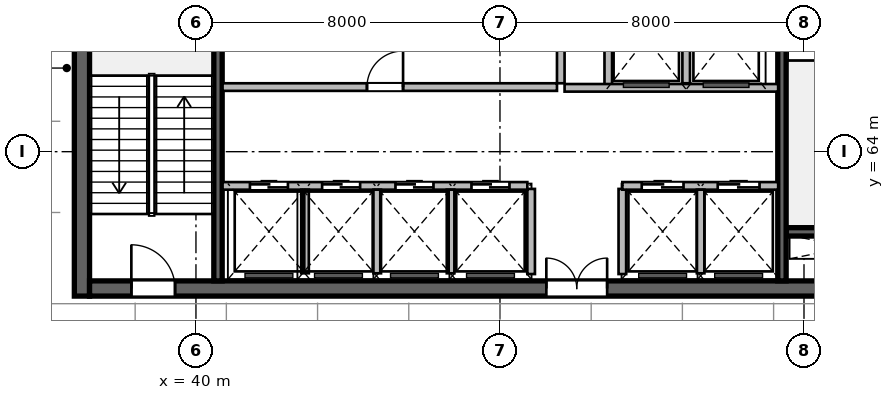
"""IFC4 building model, lengths in metres.
Left out: names, types, materials, properties, quantities, classifications, styles, units other than length and angle.
Written with IfcOpenShell. Run it as: python <this file> out.ifc"""

import sys

from ifc_helpers import new_model, si_unit, direction, frame, frame_2d, origin, place, context, subcontext, project, spatial, rectangle, extrude, source, transform, mapped, element, fill, save


model = new_model("IFC4")
c1 = context("Model", 3, precision=1e-05, world=origin(), true_north=direction((0.0, 1.0)))
c2 = subcontext(c1, "Body", "Model", "MODEL_VIEW")
j1 = project(units=[si_unit("LENGTHUNIT", "METRE"), si_unit("PLANEANGLEUNIT", "RADIAN")], contexts=[c1])
p1 = place(None, origin())
s1 = spatial("IfcSite", under=j1, at=p1, CompositionType="ELEMENT")
p2 = place(p1, origin())
s2 = spatial("IfcBuilding", under=s1, at=p2, CompositionType="ELEMENT")
p3 = place(p2, frame((0.0, 0.0, 307.8)))
s3 = spatial("IfcBuildingStorey", under=s2, at=p3, CompositionType="ELEMENT", Elevation=307.8)
m1 = source(origin(), c2, "Body", "SweptSolid", [
    extrude(rectangle(XDim=12.0, YDim=0.4, at=frame_2d((6.0, 0.0))), origin(), (0.0, 0.0, 1.0), 4.8),
])
p4 = place(p3, frame((37.0, 60.2, 0.0), z_axis=(0.0, 0.0, 1.0), x_axis=(0.0, 1.0, 0.0)))
e1 = element("IfcWall", 1, at=p4, inside=s3, PredefinedType="SHEAR", context=c2, shape_type="MappedRepresentation", body=[
    mapped(m1, transform((0.0, 0.0, 0.0), scale=1.0)),
])
m2 = source(origin(), c2, "Body", "SweptSolid", [
    extrude(rectangle(XDim=21.6, YDim=0.4, at=frame_2d((10.8, 0.0))), origin(), (0.0, 0.0, 1.0), 4.8),
])
p5 = place(p3, frame((37.2, 60.4, 0.0), z_axis=(0.0, 0.0, 1.0), x_axis=(1.0, 0.0, 0.0)))
e2 = element("IfcWall", 2, at=p5, inside=s3, PredefinedType="SHEAR", context=c2, shape_type="MappedRepresentation", body=[
    mapped(m2, transform((0.0, 0.0, 0.0), scale=1.0)),
])
p6 = place(p5, frame((1.1, 0.0, 0.0)))
e3 = element("IfcOpeningElement", 3, at=p6, cuts=e2, PredefinedType="OPENING", context=c2, shape_type="SweptSolid", body=[
    extrude(rectangle(XDim=1.15, YDim=2.15, at=frame_2d((0.575, 1.075))), frame((0.0, 0.21, 0.0), z_axis=(0.0, -1.0, 0.0), x_axis=(1.0, 0.0, 0.0)), (0.0, 0.0, 1.0), 0.42),
])
p7 = place(p5, frame((19.5, 0.0, 0.0)))
e4 = element("IfcOpeningElement", 4, at=p7, cuts=e2, PredefinedType="OPENING", context=c2, shape_type="SweptSolid", body=[
    extrude(rectangle(XDim=0.9, YDim=2.1, at=frame_2d((0.45, 1.05))), frame((0.0, 0.21, 0.0), z_axis=(0.0, -1.0, 0.0), x_axis=(1.0, 0.0, 0.0)), (0.0, 0.0, 1.0), 0.42),
])
p8 = place(p5, frame((12.02, 0.0, 0.0)))
e5 = element("IfcOpeningElement", 5, at=p8, cuts=e2, PredefinedType="OPENING", context=c2, shape_type="SweptSolid", body=[
    extrude(rectangle(XDim=1.6, YDim=2.15, at=frame_2d((0.8, 1.075))), frame((0.0, 0.21, 0.0), z_axis=(0.0, -1.0, 0.0), x_axis=(1.0, 0.0, 0.0)), (0.0, 0.0, 1.0), 0.42),
])
m3 = source(origin(), c2, "Body", "SweptSolid", [
    extrude(rectangle(XDim=3.27, YDim=0.22, at=frame_2d((1.635, 0.0))), origin(), (0.0, 0.0, 1.0), 4.8),
])
p9 = place(p3, frame((55.53, 61.89, 0.0), z_axis=(0.0, 0.0, 1.0), x_axis=(1.0, 0.0, 0.0)))
e6 = element("IfcWall", 6, at=p9, inside=s3, PredefinedType="SHEAR", context=c2, shape_type="MappedRepresentation", body=[
    mapped(m3, transform((0.0, 0.0, 0.0), scale=1.0)),
])
m4 = source(origin(), c2, "Body", "SweptSolid", [
    extrude(rectangle(XDim=11.2, YDim=0.22, at=frame_2d((5.6, 0.0))), origin(), (0.0, 0.0, 1.0), 4.8),
])
p10 = place(p3, frame((40.58, 60.6, 0.0), z_axis=(0.0, 0.0, 1.0), x_axis=(0.0, 1.0, 0.0)))
e7 = element("IfcWall", 7, at=p10, inside=s3, PredefinedType="SHEAR", context=c2, shape_type="MappedRepresentation", body=[
    mapped(m4, transform((0.0, 0.0, 0.0), scale=1.0)),
])
p11 = place(p3, frame((55.42, 60.6, 0.0), z_axis=(0.0, 0.0, 1.0), x_axis=(0.0, 1.0, 0.0)))
e8 = element("IfcWall", 8, at=p11, inside=s3, PredefinedType="SHEAR", context=c2, shape_type="MappedRepresentation", body=[
    mapped(m4, transform((0.0, 0.0, 0.0), scale=1.0)),
])
p12 = place(p11, frame((9.645, 0.0, 0.0)))
e9 = element("IfcOpeningElement", 9, at=p12, cuts=e8, PredefinedType="OPENING", context=c2, shape_type="SweptSolid", body=[
    extrude(rectangle(XDim=1.15, YDim=2.15, at=frame_2d((0.575, 1.075))), frame((0.0, 0.12, 0.0), z_axis=(0.0, -1.0, 0.0), x_axis=(1.0, 0.0, 0.0)), (0.0, 0.0, 1.0), 0.24),
])
m5 = source(origin(), c2, "Body", "SweptSolid", [
    extrude(rectangle(XDim=2.24, YDim=0.2, at=frame_2d((1.12, 0.0))), origin(), (0.0, 0.0, 1.0), 4.5),
])
for number, where, z_axis, x_axis in (
    (10, (48.82, 60.78, 0.0), (0.0, 0.0, 1.0), (0.0, 1.0, 0.0)),
    (11, (51.22, 60.78, 0.0), (0.0, 0.0, 1.0), (0.0, 1.0, 0.0)),
):
    element("IfcWall", number, at=place(p3, frame(where, z_axis=z_axis, x_axis=x_axis)), inside=s3, PredefinedType="SOLIDWALL", context=c2, shape_type="MappedRepresentation", body=[
        mapped(m5, transform((0.0, 0.0, 0.0), scale=1.0)),
    ])
m6 = source(origin(), c2, "Body", "SweptSolid", [
    extrude(rectangle(XDim=5.8, YDim=0.2, at=frame_2d((2.9, 0.0))), origin(), (0.0, 0.0, 1.0), 4.5),
])
p13 = place(p3, frame((49.6, 65.8, 0.0), z_axis=(0.0, 0.0, 1.0), x_axis=(0.0, 1.0, 0.0)))
e12 = element("IfcWall", 12, at=p13, inside=s3, PredefinedType="SOLIDWALL", context=c2, shape_type="MappedRepresentation", body=[
    mapped(m6, transform((0.0, 0.0, 0.0), scale=1.0)),
])
m7 = source(origin(), c2, "Body", "SweptSolid", [
    extrude(rectangle(XDim=2.58, YDim=0.2, at=frame_2d((1.29, 0.0))), origin(), (0.0, 0.0, 1.0), 4.5),
])
p14 = place(p3, frame((50.85, 65.68, 0.0), z_axis=(0.0, 0.0, 1.0), x_axis=(0.0, 1.0, 0.0)))
e13 = element("IfcWall", 13, at=p14, inside=s3, PredefinedType="SOLIDWALL", context=c2, shape_type="MappedRepresentation", body=[
    mapped(m7, transform((0.0, 0.0, 0.0), scale=1.0)),
])
m8 = source(origin(), c2, "Body", "SweptSolid", [
    extrude(rectangle(XDim=2.4, YDim=0.2, at=frame_2d((1.2, 0.0))), origin(), (0.0, 0.0, 1.0), 4.5),
])
p15 = place(p3, frame((52.9, 65.8, 0.0), z_axis=(0.0, 0.0, 1.0), x_axis=(0.0, 1.0, 0.0)))
e14 = element("IfcWall", 14, at=p15, inside=s3, PredefinedType="SOLIDWALL", context=c2, shape_type="MappedRepresentation", body=[
    mapped(m8, transform((0.0, 0.0, 0.0), scale=1.0)),
])
m9 = source(origin(), c2, "Body", "SweptSolid", [
    extrude(rectangle(XDim=5.62, YDim=0.2, at=frame_2d((2.81, 0.0))), origin(), (0.0, 0.0, 1.0), 4.5),
])
p16 = place(p3, frame((49.7, 65.68, 0.0), z_axis=(0.0, 0.0, 1.0), x_axis=(1.0, 0.0, 0.0)))
e15 = element("IfcWall", 15, at=p16, inside=s3, PredefinedType="SOLIDWALL", context=c2, shape_type="MappedRepresentation", body=[
    mapped(m9, transform((0.0, 0.0, 0.0), scale=1.0)),
])
m10 = source(origin(), c2, "Body", "SweptSolid", [
    extrude(rectangle(XDim=8.02, YDim=0.2, at=frame_2d((4.01, 0.0))), origin(), (0.0, 0.0, 1.0), 4.5),
])
p17 = place(p3, frame((40.7, 63.1, 0.0), z_axis=(0.0, 0.0, 1.0), x_axis=(1.0, 0.0, 0.0)))
e16 = element("IfcWall", 16, at=p17, inside=s3, PredefinedType="SOLIDWALL", context=c2, shape_type="MappedRepresentation", body=[
    mapped(m10, transform((0.0, 0.0, 0.0), scale=1.0)),
])
p18 = place(p17, frame((0.72, 0.0, 0.0)))
e17 = element("IfcOpeningElement", 17, at=p18, cuts=e16, PredefinedType="OPENING", context=c2, shape_type="SweptSolid", body=[
    extrude(rectangle(XDim=1.0, YDim=2.15, at=frame_2d((0.5, 1.075))), frame((0.0, 0.11, 0.0), z_axis=(0.0, -1.0, 0.0), x_axis=(1.0, 0.0, 0.0)), (0.0, 0.0, 1.0), 0.22),
])
p19 = place(p17, frame((2.62, 0.0, 0.0)))
e18 = element("IfcOpeningElement", 18, at=p19, cuts=e16, PredefinedType="OPENING", context=c2, shape_type="SweptSolid", body=[
    extrude(rectangle(XDim=1.0, YDim=2.15, at=frame_2d((0.5, 1.075))), frame((0.0, 0.11, 0.0), z_axis=(0.0, -1.0, 0.0), x_axis=(1.0, 0.0, 0.0)), (0.0, 0.0, 1.0), 0.22),
])
p20 = place(p17, frame((4.55, 0.0, 0.0)))
e19 = element("IfcOpeningElement", 19, at=p20, cuts=e16, PredefinedType="OPENING", context=c2, shape_type="SweptSolid", body=[
    extrude(rectangle(XDim=1.0, YDim=2.15, at=frame_2d((0.5, 1.075))), frame((0.0, 0.11, 0.0), z_axis=(0.0, -1.0, 0.0), x_axis=(1.0, 0.0, 0.0)), (0.0, 0.0, 1.0), 0.22),
])
p21 = place(p17, frame((6.55, 0.0, 0.0)))
e20 = element("IfcOpeningElement", 20, at=p21, cuts=e16, PredefinedType="OPENING", context=c2, shape_type="SweptSolid", body=[
    extrude(rectangle(XDim=1.0, YDim=2.15, at=frame_2d((0.5, 1.075))), frame((0.0, 0.11, 0.0), z_axis=(0.0, -1.0, 0.0), x_axis=(1.0, 0.0, 0.0)), (0.0, 0.0, 1.0), 0.22),
])
m11 = source(origin(), c2, "Body", "SweptSolid", [
    extrude(rectangle(XDim=4.1, YDim=0.2, at=frame_2d((2.05, 0.0))), origin(), (0.0, 0.0, 1.0), 4.5),
])
p22 = place(p3, frame((51.22, 63.1, 0.0), z_axis=(0.0, 0.0, 1.0), x_axis=(1.0, 0.0, 0.0)))
e21 = element("IfcWall", 21, at=p22, inside=s3, PredefinedType="SOLIDWALL", context=c2, shape_type="MappedRepresentation", body=[
    mapped(m11, transform((0.0, 0.0, 0.0), scale=1.0)),
])
p23 = place(p22, frame((0.51, 0.0, 0.0)))
e22 = element("IfcOpeningElement", 22, at=p23, cuts=e21, PredefinedType="OPENING", context=c2, shape_type="SweptSolid", body=[
    extrude(rectangle(XDim=1.1, YDim=2.15, at=frame_2d((0.55, 1.075))), frame((0.0, 0.11, 0.0), z_axis=(0.0, -1.0, 0.0), x_axis=(1.0, 0.0, 0.0)), (0.0, 0.0, 1.0), 0.22),
])
p24 = place(p22, frame((2.51, 0.0, 0.0)))
e23 = element("IfcOpeningElement", 23, at=p24, cuts=e21, PredefinedType="OPENING", context=c2, shape_type="SweptSolid", body=[
    extrude(rectangle(XDim=1.1, YDim=2.15, at=frame_2d((0.55, 1.075))), frame((0.0, 0.11, 0.0), z_axis=(0.0, -1.0, 0.0), x_axis=(1.0, 0.0, 0.0)), (0.0, 0.0, 1.0), 0.22),
])
m12 = source(origin(), c2, "Body", "SweptSolid", [
    extrude(rectangle(XDim=2.2, YDim=0.2, at=frame_2d((1.1, 0.0))), origin(), (0.0, 0.0, 1.0), 4.5),
])
for number, where, z_axis, x_axis in (
    (24, (42.87, 60.8, 0.0), (0.0, 0.0, 1.0), (0.0, 1.0, 0.0)),
    (25, (44.77, 60.8, 0.0), (0.0, 0.0, 1.0), (0.0, 1.0, 0.0)),
    (26, (46.7, 60.8, 0.0), (0.0, 0.0, 1.0), (0.0, 1.0, 0.0)),
    (27, (53.28, 60.8, 0.0), (0.0, 0.0, 1.0), (0.0, 1.0, 0.0)),
):
    element("IfcWall", number, at=place(p3, frame(where, z_axis=z_axis, x_axis=x_axis)), inside=s3, PredefinedType="SOLIDWALL", context=c2, shape_type="MappedRepresentation", body=[
        mapped(m12, transform((0.0, 0.0, 0.0), scale=1.0)),
    ])
m13 = source(origin(), c2, "Body", "SweptSolid", [
    extrude(rectangle(XDim=8.8, YDim=0.2, at=frame_2d((4.4, 0.0))), origin(), (0.0, 0.0, 1.0), 4.5),
])
p25 = place(p3, frame((40.7, 65.7, 0.0), z_axis=(0.0, 0.0, 1.0), x_axis=(1.0, 0.0, 0.0)))
e28 = element("IfcWall", 28, at=p25, inside=s3, PredefinedType="SOLIDWALL", context=c2, shape_type="MappedRepresentation", body=[
    mapped(m13, transform((0.0, 0.0, 0.0), scale=1.0)),
])
p26 = place(p25, frame((3.8, 0.0, 0.0)))
e29 = element("IfcOpeningElement", 29, at=p26, cuts=e28, PredefinedType="OPENING", context=c2, shape_type="SweptSolid", body=[
    extrude(rectangle(XDim=0.95, YDim=2.15, at=frame_2d((0.475, 1.075))), frame((0.0, 0.11, 0.0), z_axis=(0.0, -1.0, 0.0), x_axis=(1.0, 0.0, 0.0)), (0.0, 0.0, 1.0), 0.22),
])
m14 = source(origin(), c2, "Body", "SweptSolid", [
    extrude(rectangle(XDim=1.15, YDim=2.15, at=frame_2d((0.575, 1.075))), frame((0.0, 0.025, 0.0), z_axis=(0.0, -1.0, 0.0), x_axis=(1.0, 0.0, 0.0)), (0.0, 0.0, 1.0), 0.05),
])
p27 = place(p6, origin())
e30 = element("IfcDoor", 30, at=p27, inside=s3, OperationType="SINGLE_SWING_LEFT", PredefinedType="DOOR", context=c2, shape_type="MappedRepresentation", body=[
    mapped(m14, transform((0.0, 0.0, 0.0), scale=1.0)),
])
fill(e3, e30)
m15 = source(origin(), c2, "Body", "SweptSolid", [
    extrude(rectangle(XDim=1.6, YDim=2.15, at=frame_2d((0.8, 1.075))), frame((0.0, 0.025, 0.0), z_axis=(0.0, -1.0, 0.0), x_axis=(1.0, 0.0, 0.0)), (0.0, 0.0, 1.0), 0.05),
])
p28 = place(p8, origin())
e31 = element("IfcDoor", 31, at=p28, inside=s3, OperationType="DOUBLE_DOOR_SINGLE_SWING", PredefinedType="DOOR", context=c2, shape_type="MappedRepresentation", body=[
    mapped(m15, transform((0.0, 0.0, 0.0), scale=1.0)),
])
fill(e5, e31)
m16 = source(origin(), c2, "Body", "SweptSolid", [
    extrude(rectangle(XDim=1.0, YDim=2.15, at=frame_2d((0.5, 1.075))), frame((0.0, 0.025, 0.0), z_axis=(0.0, -1.0, 0.0), x_axis=(1.0, 0.0, 0.0)), (0.0, 0.0, 1.0), 0.05),
])
p29 = place(p18, origin())
e32 = element("IfcDoor", 32, at=p29, inside=s3, OperationType="DOUBLE_DOOR_SLIDING", PredefinedType="DOOR", context=c2, shape_type="MappedRepresentation", body=[
    mapped(m16, transform((0.0, 0.0, 0.0), scale=1.0)),
])
fill(e17, e32)
p30 = place(p19, origin())
e33 = element("IfcDoor", 33, at=p30, inside=s3, OperationType="DOUBLE_DOOR_SLIDING", PredefinedType="DOOR", context=c2, shape_type="MappedRepresentation", body=[
    mapped(m16, transform((0.0, 0.0, 0.0), scale=1.0)),
])
fill(e18, e33)
p31 = place(p20, origin())
e34 = element("IfcDoor", 34, at=p31, inside=s3, OperationType="DOUBLE_DOOR_SLIDING", PredefinedType="DOOR", context=c2, shape_type="MappedRepresentation", body=[
    mapped(m16, transform((0.0, 0.0, 0.0), scale=1.0)),
])
fill(e19, e34)
p32 = place(p21, origin())
e35 = element("IfcDoor", 35, at=p32, inside=s3, OperationType="DOUBLE_DOOR_SLIDING", PredefinedType="DOOR", context=c2, shape_type="MappedRepresentation", body=[
    mapped(m16, transform((0.0, 0.0, 0.0), scale=1.0)),
])
fill(e20, e35)
m17 = source(origin(), c2, "Body", "SweptSolid", [
    extrude(rectangle(XDim=1.1, YDim=2.15, at=frame_2d((0.55, 1.075))), frame((0.0, 0.025, 0.0), z_axis=(0.0, -1.0, 0.0), x_axis=(1.0, 0.0, 0.0)), (0.0, 0.0, 1.0), 0.05),
])
p33 = place(p23, origin())
e36 = element("IfcDoor", 36, at=p33, inside=s3, OperationType="DOUBLE_DOOR_SLIDING", PredefinedType="DOOR", context=c2, shape_type="MappedRepresentation", body=[
    mapped(m17, transform((0.0, 0.0, 0.0), scale=1.0)),
])
fill(e22, e36)
p34 = place(p24, origin())
e37 = element("IfcDoor", 37, at=p34, inside=s3, OperationType="DOUBLE_DOOR_SLIDING", PredefinedType="DOOR", context=c2, shape_type="MappedRepresentation", body=[
    mapped(m17, transform((0.0, 0.0, 0.0), scale=1.0)),
])
fill(e23, e37)
m18 = source(origin(), c2, "Body", "SweptSolid", [
    extrude(rectangle(XDim=0.95, YDim=2.15, at=frame_2d((0.475, 1.075))), frame((0.0, 0.025, 0.0), z_axis=(0.0, -1.0, 0.0), x_axis=(1.0, 0.0, 0.0)), (0.0, 0.0, 1.0), 0.05),
])
p35 = place(p26, origin())
e38 = element("IfcDoor", 38, at=p35, inside=s3, OperationType="SINGLE_SWING_RIGHT", PredefinedType="DOOR", context=c2, shape_type="MappedRepresentation", body=[
    mapped(m18, transform((0.0, 0.0, 0.0), scale=1.0)),
])
fill(e29, e38)
save(model, sys.argv[1])
